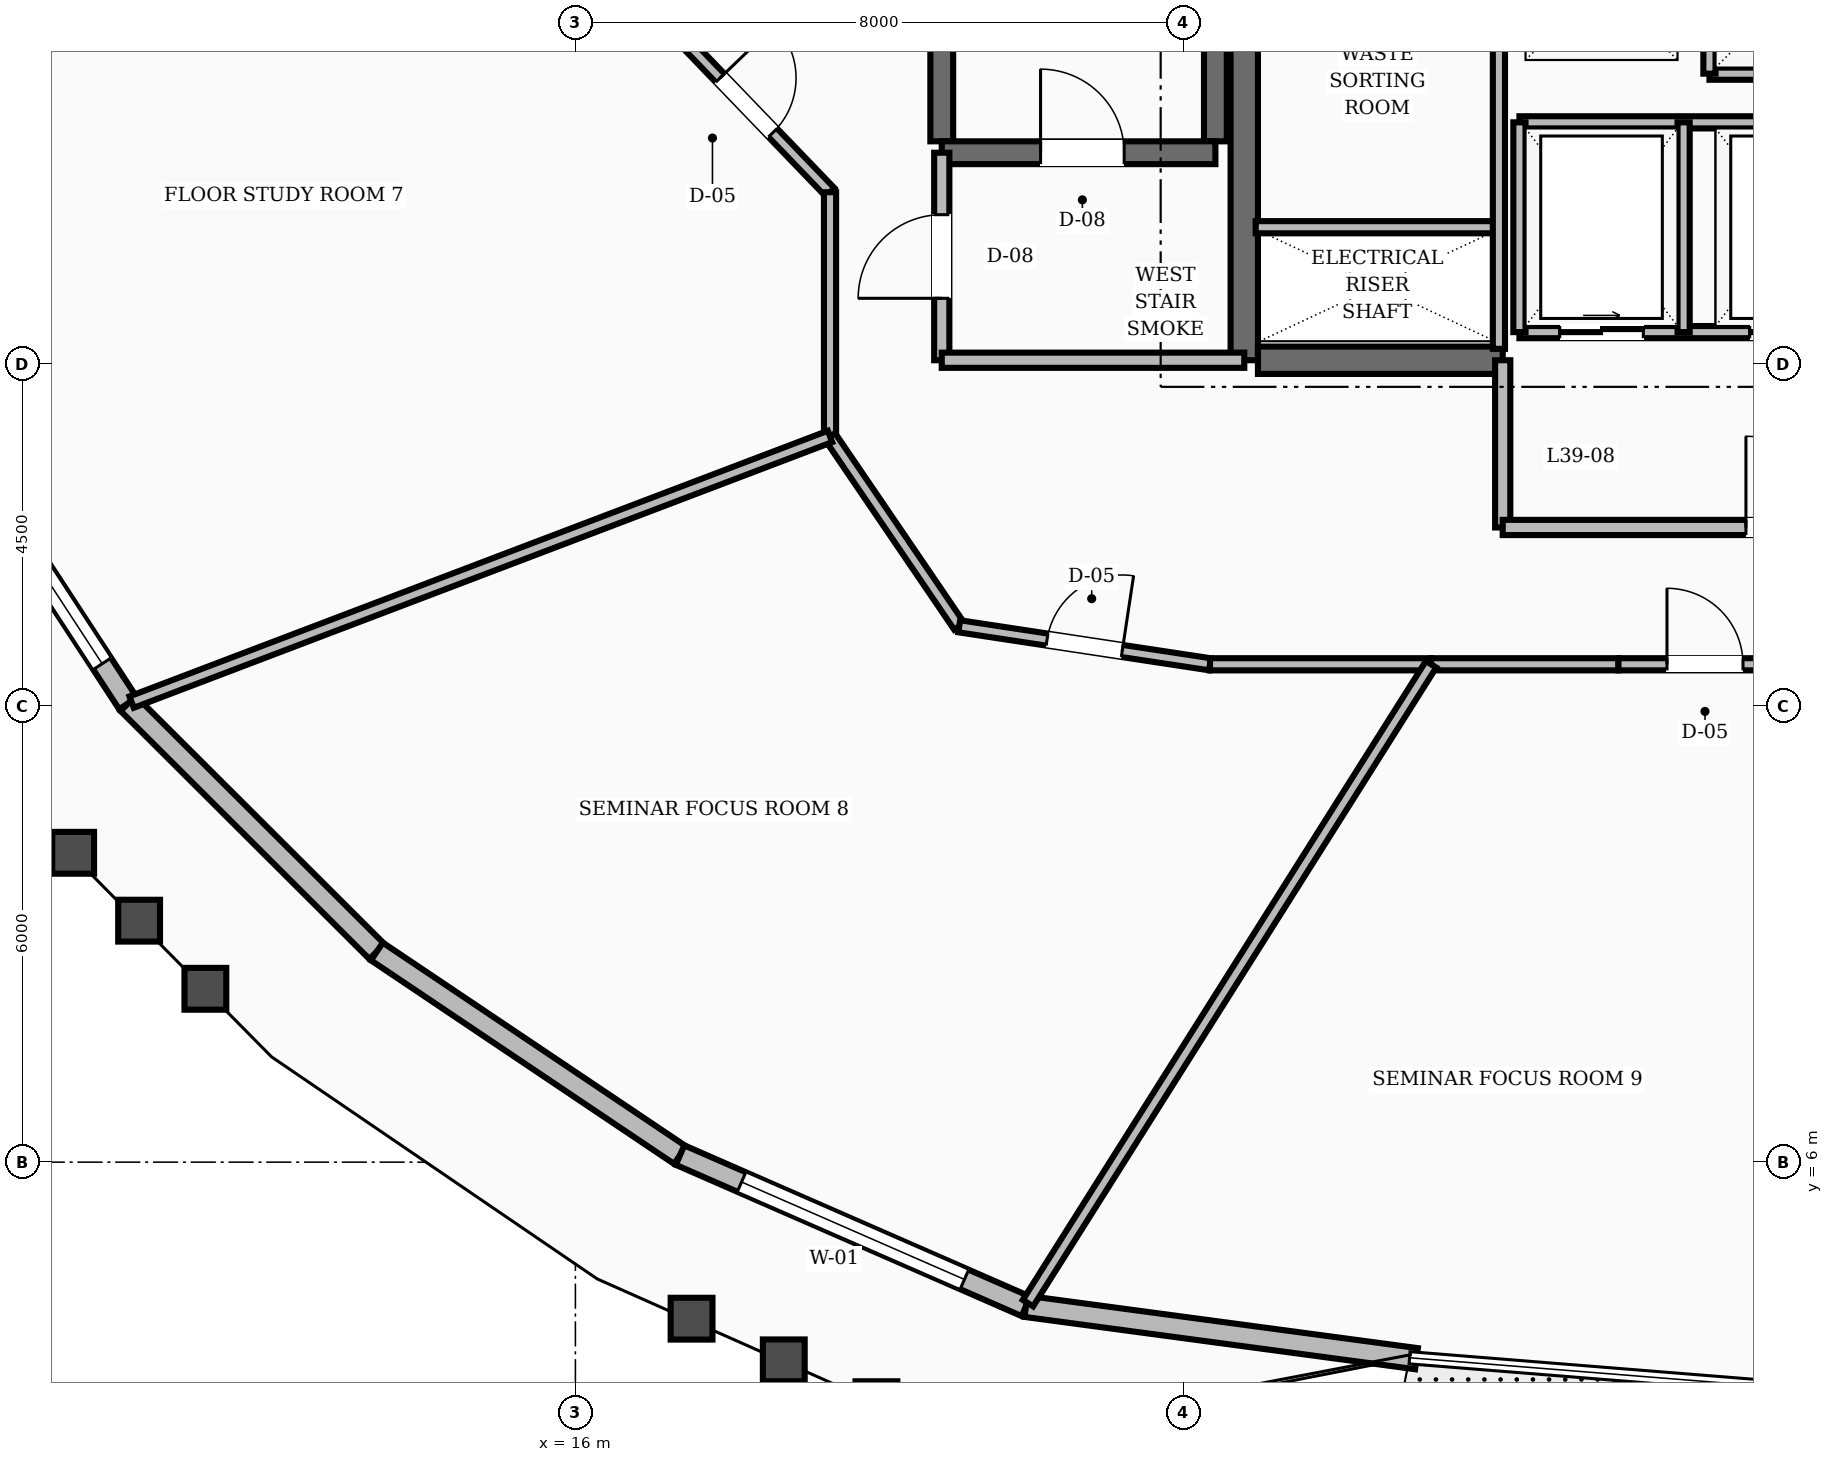
"""IFC4 building model, lengths in metres.
Left out: names, types, materials, properties, quantities, classifications, styles, units other than length and angle.
Written with IfcOpenShell. Run it as: python <this file> out.ifc"""

import sys

from ifc_helpers import new_model, si_unit, direction, frame, frame_2d, origin, place, context, subcontext, project, spatial, rectangle, extrude, element, fill, save


model = new_model("IFC4")
c1 = context("Model", 3, precision=1e-05, world=origin(), true_north=direction((0.0, 1.0)))
c2 = subcontext(c1, "Body", "Model", "MODEL_VIEW")
j1 = project(units=[si_unit("LENGTHUNIT", "METRE"), si_unit("PLANEANGLEUNIT", "RADIAN")], contexts=[c1])
p1 = place(None, origin())
s1 = spatial("IfcSite", under=j1, at=p1, CompositionType="ELEMENT")
p2 = place(p1, origin())
s2 = spatial("IfcBuilding", under=s1, at=p2, CompositionType="ELEMENT")
p3 = place(p2, frame((0.0, 0.0, 153.2)))
s3 = spatial("IfcBuildingStorey", under=s2, at=p3, CompositionType="ELEMENT", Elevation=153.2)
p4 = place(p3, frame((24.8, 16.55, 0.0), z_axis=(0.0, 0.0, 1.0), x_axis=(0.0, 1.0, 0.0)))
e1 = element("IfcWall", 1, at=p4, inside=s3, PredefinedType="SHEAR", context=c2, shape_type="SweptSolid", body=[
    extrude(rectangle(XDim=6.3, YDim=0.36, at=frame_2d((3.15, 0.0))), origin(), (0.0, 0.0, 1.0), 3.6),
])
p5 = place(p3, frame((24.98, 16.55, 0.0), z_axis=(0.0, 0.0, 1.0), x_axis=(1.0, 0.0, 0.0)))
e2 = element("IfcWall", 2, at=p5, inside=s3, PredefinedType="SHEAR", context=c2, shape_type="SweptSolid", body=[
    extrude(rectangle(XDim=3.22, YDim=0.36, at=frame_2d((1.61, 0.0))), origin(), (0.0, 0.0, 1.0), 3.6),
])
for number, where, z_axis, x_axis in (
    (3, (20.82, 19.43, 0.0), (0.0, 0.0, 1.0), (0.0, 1.0, 0.0)),
    (4, (24.42, 19.43, 0.0), (0.0, 0.0, 1.0), (0.0, 1.0, 0.0)),
):
    element("IfcWall", number, at=place(p3, frame(where, z_axis=z_axis, x_axis=x_axis)), inside=s3, PredefinedType="SHEAR", context=c2, shape_type="SweptSolid", body=[
        extrude(rectangle(XDim=8.74, YDim=0.3, at=frame_2d((4.37, 0.0))), origin(), (0.0, 0.0, 1.0), 3.6),
    ])
p6 = place(p3, frame((20.82, 19.28, 0.0), z_axis=(0.0, 0.0, 1.0), x_axis=(1.0, 0.0, 0.0)))
e5 = element("IfcWall", 5, at=p6, inside=s3, PredefinedType="SHEAR", context=c2, shape_type="SweptSolid", body=[
    extrude(rectangle(XDim=3.6, YDim=0.3, at=frame_2d((1.8, 0.0))), origin(), (0.0, 0.0, 1.0), 3.6),
])
p7 = place(p6, frame((1.3, 0.0, 0.0)))
e6 = element("IfcOpeningElement", 6, at=p7, cuts=e5, PredefinedType="OPENING", context=c2, shape_type="SweptSolid", body=[
    extrude(rectangle(XDim=1.1, YDim=2.1, at=frame_2d((0.55, 1.05))), frame((0.0, 0.16, 0.0), z_axis=(0.0, -1.0, 0.0), x_axis=(1.0, 0.0, 0.0)), (0.0, 0.0, 1.0), 0.32),
])
p8 = place(p3, frame((7.683, 15.758, 0.0), z_axis=(0.0, 0.0, 1.0), x_axis=(0.546910623985, -0.837190999338, 0.0)))
e7 = element("IfcWall", 7, at=p8, inside=s3, PredefinedType="STANDARD", context=c2, shape_type="SweptSolid", body=[
    extrude(rectangle(XDim=4.448, YDim=0.28, at=frame_2d((2.224, 0.0))), origin(), (0.0, 0.0, 1.0), 2.82),
])
p9 = place(p8, frame((0.624, 0.0, 0.8)))
e8 = element("IfcOpeningElement", 8, at=p9, cuts=e7, PredefinedType="OPENING", context=c2, shape_type="SweptSolid", body=[
    extrude(rectangle(XDim=3.2, YDim=1.65, at=frame_2d((1.6, 0.825))), frame((0.0, 0.15, 0.0), z_axis=(0.0, -1.0, 0.0), x_axis=(1.0, 0.0, 0.0)), (0.0, 0.0, 1.0), 0.3),
])
p10 = place(p3, frame((10.115, 12.035, 0.0), z_axis=(0.0, 0.0, 1.0), x_axis=(0.708162399008, -0.706049585108, 0.0)))
e9 = element("IfcWall", 9, at=p10, inside=s3, PredefinedType="STANDARD", context=c2, shape_type="SweptSolid", body=[
    extrude(rectangle(XDim=4.622, YDim=0.28, at=frame_2d((2.311, 0.0))), origin(), (0.0, 0.0, 1.0), 2.82),
])
p11 = place(p3, frame((13.388, 8.771, 0.0), z_axis=(0.0, 0.0, 1.0), x_axis=(0.830192910363, -0.557476216158, 0.0)))
e10 = element("IfcWall", 10, at=p11, inside=s3, PredefinedType="STANDARD", context=c2, shape_type="SweptSolid", body=[
    extrude(rectangle(XDim=4.805, YDim=0.28, at=frame_2d((2.402, 0.0))), origin(), (0.0, 0.0, 1.0), 2.82),
])
p12 = place(p3, frame((17.377, 6.093, 0.0), z_axis=(0.0, 0.0, 1.0), x_axis=(0.916213737075, -0.400689890058, 0.0)))
e11 = element("IfcWall", 11, at=p12, inside=s3, PredefinedType="STANDARD", context=c2, shape_type="SweptSolid", body=[
    extrude(rectangle(XDim=4.966, YDim=0.28, at=frame_2d((2.483, 0.0))), origin(), (0.0, 0.0, 1.0), 2.82),
])
p13 = place(p12, frame((0.883, 0.0, 0.8)))
e12 = element("IfcOpeningElement", 12, at=p13, cuts=e11, PredefinedType="OPENING", context=c2, shape_type="SweptSolid", body=[
    extrude(rectangle(XDim=3.2, YDim=1.65, at=frame_2d((1.6, 0.825))), frame((0.0, 0.15, 0.0), z_axis=(0.0, -1.0, 0.0), x_axis=(1.0, 0.0, 0.0)), (0.0, 0.0, 1.0), 0.3),
])
p14 = place(p3, frame((21.927, 4.103, 0.0), z_axis=(0.0, 0.0, 1.0), x_axis=(0.991142142186, -0.132805323623, 0.0)))
e13 = element("IfcWall", 13, at=p14, inside=s3, PredefinedType="STANDARD", context=c2, shape_type="SweptSolid", body=[
    extrude(rectangle(XDim=5.184, YDim=0.28, at=frame_2d((2.592, 0.0))), origin(), (0.0, 0.0, 1.0), 2.82),
])
p15 = place(p3, frame((20.82, 16.55, 0.0), z_axis=(0.0, 0.0, 1.0), x_axis=(0.0, 1.0, 0.0)))
e14 = element("IfcWall", 14, at=p15, inside=s3, PredefinedType="SOLIDWALL", context=c2, shape_type="SweptSolid", body=[
    extrude(rectangle(XDim=2.73, YDim=0.2, at=frame_2d((1.365, 0.0))), origin(), (0.0, 0.0, 1.0), 2.8),
])
p16 = place(p15, frame((0.815, 0.0, 0.0)))
e15 = element("IfcOpeningElement", 15, at=p16, cuts=e14, PredefinedType="OPENING", context=c2, shape_type="SweptSolid", body=[
    extrude(rectangle(XDim=1.1, YDim=2.1, at=frame_2d((0.55, 1.05))), frame((0.0, 0.11, 0.0), z_axis=(0.0, -1.0, 0.0), x_axis=(1.0, 0.0, 0.0)), (0.0, 0.0, 1.0), 0.22),
])
p17 = place(p3, frame((20.82, 16.55, 0.0), z_axis=(0.0, 0.0, 1.0), x_axis=(1.0, 0.0, 0.0)))
e16 = element("IfcWall", 16, at=p17, inside=s3, PredefinedType="SOLIDWALL", context=c2, shape_type="SweptSolid", body=[
    extrude(rectangle(XDim=3.98, YDim=0.2, at=frame_2d((1.99, 0.0))), origin(), (0.0, 0.0, 1.0), 2.8),
])
p18 = place(p3, frame((28.2, 14.35, 0.0), z_axis=(0.0, 0.0, 1.0), x_axis=(0.0, 1.0, 0.0)))
e17 = element("IfcWall", 17, at=p18, inside=s3, PredefinedType="SOLIDWALL", context=c2, shape_type="SweptSolid", body=[
    extrude(rectangle(XDim=2.2, YDim=0.2, at=frame_2d((1.1, 0.0))), origin(), (0.0, 0.0, 1.0), 2.8),
])
p19 = place(p3, frame((28.2, 14.35, 0.0), z_axis=(0.0, 0.0, 1.0), x_axis=(1.0, 0.0, 0.0)))
e18 = element("IfcWall", 18, at=p19, inside=s3, PredefinedType="SOLIDWALL", context=c2, shape_type="SweptSolid", body=[
    extrude(rectangle(XDim=7.6, YDim=0.2, at=frame_2d((3.8, 0.0))), origin(), (0.0, 0.0, 1.0), 2.8),
])
p20 = place(p19, frame((3.2, 0.0, 0.0)))
e19 = element("IfcOpeningElement", 19, at=p20, cuts=e18, PredefinedType="OPENING", context=c2, shape_type="SweptSolid", body=[
    extrude(rectangle(XDim=1.2, YDim=2.1, at=frame_2d((0.6, 1.05))), frame((0.0, 0.11, 0.0), z_axis=(0.0, -1.0, 0.0), x_axis=(1.0, 0.0, 0.0)), (0.0, 0.0, 1.0), 0.22),
])
p21 = place(p3, frame((30.92, 20.32, 0.0), z_axis=(0.0, 0.0, 1.0), x_axis=(1.0, 0.0, 0.0)))
e20 = element("IfcWall", 20, at=p21, inside=s3, PredefinedType="SOLIDWALL", context=c2, shape_type="SweptSolid", body=[
    extrude(rectangle(XDim=4.76, YDim=0.16, at=frame_2d((2.38, 0.0))), origin(), (0.0, 0.0, 1.0), 2.8),
])
p22 = place(p3, frame((30.92, 20.32, 0.0), z_axis=(0.0, 0.0, 1.0), x_axis=(0.0, 1.0, 0.0)))
e21 = element("IfcWall", 21, at=p22, inside=s3, PredefinedType="SOLIDWALL", context=c2, shape_type="SweptSolid", body=[
    extrude(rectangle(XDim=2.36, YDim=0.16, at=frame_2d((1.18, 0.0))), origin(), (0.0, 0.0, 1.0), 2.8),
])
p23 = place(p3, frame((28.42, 16.92, 0.0), z_axis=(0.0, 0.0, 1.0), x_axis=(1.0, 0.0, 0.0)))
e22 = element("IfcWall", 22, at=p23, inside=s3, PredefinedType="SOLIDWALL", context=c2, shape_type="SweptSolid", body=[
    extrude(rectangle(XDim=7.16, YDim=0.16, at=frame_2d((3.58, 0.0))), origin(), (0.0, 0.0, 1.0), 2.8),
])
p24 = place(p23, frame((0.53, 0.0, 0.0)))
e23 = element("IfcOpeningElement", 23, at=p24, cuts=e22, PredefinedType="OPENING", context=c2, shape_type="SweptSolid", body=[
    extrude(rectangle(XDim=1.1, YDim=2.15, at=frame_2d((0.55, 1.075))), frame((0.0, 0.09, 0.0), z_axis=(0.0, -1.0, 0.0), x_axis=(1.0, 0.0, 0.0)), (0.0, 0.0, 1.0), 0.18),
])
p25 = place(p23, frame((3.03, 0.0, 0.0)))
e24 = element("IfcOpeningElement", 24, at=p25, cuts=e22, PredefinedType="OPENING", context=c2, shape_type="SweptSolid", body=[
    extrude(rectangle(XDim=1.1, YDim=2.15, at=frame_2d((0.55, 1.075))), frame((0.0, 0.09, 0.0), z_axis=(0.0, -1.0, 0.0), x_axis=(1.0, 0.0, 0.0)), (0.0, 0.0, 1.0), 0.18),
])
p26 = place(p23, frame((5.53, 0.0, 0.0)))
e25 = element("IfcOpeningElement", 25, at=p26, cuts=e22, PredefinedType="OPENING", context=c2, shape_type="SweptSolid", body=[
    extrude(rectangle(XDim=1.1, YDim=2.15, at=frame_2d((0.55, 1.075))), frame((0.0, 0.09, 0.0), z_axis=(0.0, -1.0, 0.0), x_axis=(1.0, 0.0, 0.0)), (0.0, 0.0, 1.0), 0.18),
])
p27 = place(p3, frame((28.42, 19.68, 0.0), z_axis=(0.0, 0.0, 1.0), x_axis=(1.0, 0.0, 0.0)))
e26 = element("IfcWall", 26, at=p27, inside=s3, PredefinedType="SOLIDWALL", context=c2, shape_type="SweptSolid", body=[
    extrude(rectangle(XDim=7.16, YDim=0.16, at=frame_2d((3.58, 0.0))), origin(), (0.0, 0.0, 1.0), 2.8),
])
for number, where, z_axis, x_axis in (
    (27, (28.42, 16.92, 0.0), (0.0, 0.0, 1.0), (0.0, 1.0, 0.0)),
    (28, (30.58, 16.92, 0.0), (0.0, 0.0, 1.0), (0.0, 1.0, 0.0)),
):
    element("IfcWall", number, at=place(p3, frame(where, z_axis=z_axis, x_axis=x_axis)), inside=s3, PredefinedType="SOLIDWALL", context=c2, shape_type="SweptSolid", body=[
        extrude(rectangle(XDim=2.76, YDim=0.16, at=frame_2d((1.38, 0.0))), origin(), (0.0, 0.0, 1.0), 2.8),
    ])
p28 = place(p3, frame((24.95, 18.3, 0.0), z_axis=(0.0, 0.0, 1.0), x_axis=(1.0, 0.0, 0.0)))
e29 = element("IfcWall", 29, at=p28, inside=s3, PredefinedType="SOLIDWALL", context=c2, shape_type="SweptSolid", body=[
    extrude(rectangle(XDim=3.2, YDim=0.16, at=frame_2d((1.6, 0.0))), origin(), (0.0, 0.0, 1.0), 2.8),
])
p29 = place(p3, frame((28.15, 16.7, 0.0), z_axis=(0.0, 0.0, 1.0), x_axis=(0.0, 1.0, 0.0)))
e30 = element("IfcWall", 30, at=p29, inside=s3, PredefinedType="SOLIDWALL", context=c2, shape_type="SweptSolid", body=[
    extrude(rectangle(XDim=6.05, YDim=0.16, at=frame_2d((3.025, 0.0))), origin(), (0.0, 0.0, 1.0), 2.8),
])
p30 = place(p3, frame((17.15, 21.046, 0.0), z_axis=(0.0, 0.0, 1.0), x_axis=(0.693473090138, -0.72048252807, 0.0)))
e31 = element("IfcWall", 31, at=p30, inside=s3, PredefinedType="SOLIDWALL", context=c2, shape_type="SweptSolid", body=[
    extrude(rectangle(XDim=3.173, YDim=0.16, at=frame_2d((1.586, 0.0))), origin(), (0.0, 0.0, 1.0), 2.8),
])
p31 = place(p30, frame((1.086, 0.0, 0.0)))
e32 = element("IfcOpeningElement", 32, at=p31, cuts=e31, PredefinedType="OPENING", context=c2, shape_type="SweptSolid", body=[
    extrude(rectangle(XDim=1.0, YDim=2.1, at=frame_2d((0.5, 1.05))), frame((0.0, 0.09, 0.0), z_axis=(0.0, -1.0, 0.0), x_axis=(1.0, 0.0, 0.0)), (0.0, 0.0, 1.0), 0.18),
])
p32 = place(p3, frame((19.35, 18.76, 0.0), z_axis=(0.0, 0.0, 1.0), x_axis=(0.0, -1.0, 0.0)))
e33 = element("IfcWall", 33, at=p32, inside=s3, PredefinedType="SOLIDWALL", context=c2, shape_type="SweptSolid", body=[
    extrude(rectangle(XDim=3.213, YDim=0.16, at=frame_2d((1.606, 0.0))), origin(), (0.0, 0.0, 1.0), 2.8),
])
p33 = place(p3, frame((19.35, 15.548, 0.0), z_axis=(0.0, 0.0, 1.0), x_axis=(0.562674669208, -0.826678423955, 0.0)))
e34 = element("IfcWall", 34, at=p33, inside=s3, PredefinedType="SOLIDWALL", context=c2, shape_type="SweptSolid", body=[
    extrude(rectangle(XDim=3.021, YDim=0.16, at=frame_2d((1.511, 0.0))), origin(), (0.0, 0.0, 1.0), 2.8),
])
p34 = place(p3, frame((21.05, 13.05, 0.0), z_axis=(0.0, 0.0, 1.0), x_axis=(0.988710906508, -0.149835721217, 0.0)))
e35 = element("IfcWall", 35, at=p34, inside=s3, PredefinedType="SOLIDWALL", context=c2, shape_type="SweptSolid", body=[
    extrude(rectangle(XDim=3.337, YDim=0.16, at=frame_2d((1.668, 0.0))), origin(), (0.0, 0.0, 1.0), 2.8),
])
p35 = place(p34, frame((1.168, 0.0, 0.0)))
e36 = element("IfcOpeningElement", 36, at=p35, cuts=e35, PredefinedType="OPENING", context=c2, shape_type="SweptSolid", body=[
    extrude(rectangle(XDim=1.0, YDim=2.1, at=frame_2d((0.5, 1.05))), frame((0.0, 0.09, 0.0), z_axis=(0.0, -1.0, 0.0), x_axis=(1.0, 0.0, 0.0)), (0.0, 0.0, 1.0), 0.18),
])
p36 = place(p3, frame((24.349, 12.55, 0.0), z_axis=(0.0, 0.0, 1.0), x_axis=(1.0, 0.0, 0.0)))
e37 = element("IfcWall", 37, at=p36, inside=s3, PredefinedType="SOLIDWALL", context=c2, shape_type="SweptSolid", body=[
    extrude(rectangle(XDim=2.908, YDim=0.16, at=frame_2d((1.454, 0.0))), origin(), (0.0, 0.0, 1.0), 2.8),
])
p37 = place(p3, frame((27.257, 12.55, 0.0), z_axis=(0.0, 0.0, 1.0), x_axis=(1.0, 0.0, 0.0)))
e38 = element("IfcWall", 38, at=p37, inside=s3, PredefinedType="SOLIDWALL", context=c2, shape_type="SweptSolid", body=[
    extrude(rectangle(XDim=2.465, YDim=0.16, at=frame_2d((1.232, 0.0))), origin(), (0.0, 0.0, 1.0), 2.8),
])
p38 = place(p3, frame((29.722, 12.55, 0.0), z_axis=(0.0, 0.0, 1.0), x_axis=(1.0, 0.0, 0.0)))
e39 = element("IfcWall", 39, at=p38, inside=s3, PredefinedType="SOLIDWALL", context=c2, shape_type="SweptSolid", body=[
    extrude(rectangle(XDim=2.278, YDim=0.16, at=frame_2d((1.139, 0.0))), origin(), (0.0, 0.0, 1.0), 2.8),
])
p39 = place(p38, frame((0.639, 0.0, 0.0)))
e40 = element("IfcOpeningElement", 40, at=p39, cuts=e39, PredefinedType="OPENING", context=c2, shape_type="SweptSolid", body=[
    extrude(rectangle(XDim=1.0, YDim=2.1, at=frame_2d((0.5, 1.05))), frame((0.0, 0.09, 0.0), z_axis=(0.0, -1.0, 0.0), x_axis=(1.0, 0.0, 0.0)), (0.0, 0.0, 1.0), 0.18),
])
p40 = place(p3, frame((19.35, 15.548, 0.0), z_axis=(0.0, 0.0, 1.0), x_axis=(-0.934670555549, -0.355515052549, 0.0)))
e41 = element("IfcWall", 41, at=p40, inside=s3, PredefinedType="SOLIDWALL", context=c2, shape_type="SweptSolid", body=[
    extrude(rectangle(XDim=9.831, YDim=0.16, at=frame_2d((4.915, 0.0))), origin(), (0.0, 0.0, 1.0), 2.8),
])
p41 = place(p3, frame((27.257, 12.55, 0.0), z_axis=(0.0, 0.0, 1.0), x_axis=(-0.53362877713, -0.84571882338, 0.0)))
e42 = element("IfcWall", 42, at=p41, inside=s3, PredefinedType="SOLIDWALL", context=c2, shape_type="SweptSolid", body=[
    extrude(rectangle(XDim=9.938, YDim=0.16, at=frame_2d((4.969, 0.0))), origin(), (0.0, 0.0, 1.0), 2.8),
])
p42 = place(p9, origin())
e43 = element("IfcWindow", 43, at=p42, inside=s3, PartitioningType="SINGLE_PANEL", PredefinedType="WINDOW", context=c2, shape_type="SweptSolid", body=[
    extrude(rectangle(XDim=3.2, YDim=1.65, at=frame_2d((1.6, 0.825))), frame((0.0, 0.03, 0.0), z_axis=(0.0, -1.0, 0.0), x_axis=(1.0, 0.0, 0.0)), (0.0, 0.0, 1.0), 0.06),
])
fill(e8, e43)
p43 = place(p13, origin())
e44 = element("IfcWindow", 44, at=p43, inside=s3, PartitioningType="SINGLE_PANEL", PredefinedType="WINDOW", context=c2, shape_type="SweptSolid", body=[
    extrude(rectangle(XDim=3.2, YDim=1.65, at=frame_2d((1.6, 0.825))), frame((0.0, 0.03, 0.0), z_axis=(0.0, -1.0, 0.0), x_axis=(1.0, 0.0, 0.0)), (0.0, 0.0, 1.0), 0.06),
])
fill(e12, e44)
p44 = place(p7, origin())
e45 = element("IfcDoor", 45, at=p44, inside=s3, OperationType="SINGLE_SWING_LEFT", PredefinedType="DOOR", context=c2, shape_type="SweptSolid", body=[
    extrude(rectangle(XDim=1.1, YDim=2.1, at=frame_2d((0.55, 1.05))), frame((0.0, 0.025, 0.0), z_axis=(0.0, -1.0, 0.0), x_axis=(1.0, 0.0, 0.0)), (0.0, 0.0, 1.0), 0.05),
])
fill(e6, e45)
p45 = place(p16, origin())
e46 = element("IfcDoor", 46, at=p45, inside=s3, OperationType="SINGLE_SWING_LEFT", PredefinedType="DOOR", context=c2, shape_type="SweptSolid", body=[
    extrude(rectangle(XDim=1.1, YDim=2.1, at=frame_2d((0.55, 1.05))), frame((0.0, 0.025, 0.0), z_axis=(0.0, -1.0, 0.0), x_axis=(1.0, 0.0, 0.0)), (0.0, 0.0, 1.0), 0.05),
])
fill(e15, e46)
p46 = place(p20, origin())
e47 = element("IfcDoor", 47, at=p46, inside=s3, OperationType="SINGLE_SWING_LEFT", PredefinedType="DOOR", context=c2, shape_type="SweptSolid", body=[
    extrude(rectangle(XDim=1.2, YDim=2.1, at=frame_2d((0.6, 1.05))), frame((0.0, 0.025, 0.0), z_axis=(0.0, -1.0, 0.0), x_axis=(1.0, 0.0, 0.0)), (0.0, 0.0, 1.0), 0.05),
])
fill(e19, e47)
p47 = place(p24, origin())
e48 = element("IfcDoor", 48, at=p47, inside=s3, OperationType="SLIDING_TO_RIGHT", PredefinedType="DOOR", context=c2, shape_type="SweptSolid", body=[
    extrude(rectangle(XDim=1.1, YDim=2.15, at=frame_2d((0.55, 1.075))), frame((0.0, 0.025, 0.0), z_axis=(0.0, -1.0, 0.0), x_axis=(1.0, 0.0, 0.0)), (0.0, 0.0, 1.0), 0.05),
])
fill(e23, e48)
p48 = place(p25, origin())
e49 = element("IfcDoor", 49, at=p48, inside=s3, OperationType="SLIDING_TO_RIGHT", PredefinedType="DOOR", context=c2, shape_type="SweptSolid", body=[
    extrude(rectangle(XDim=1.1, YDim=2.15, at=frame_2d((0.55, 1.075))), frame((0.0, 0.025, 0.0), z_axis=(0.0, -1.0, 0.0), x_axis=(1.0, 0.0, 0.0)), (0.0, 0.0, 1.0), 0.05),
])
fill(e24, e49)
p49 = place(p31, origin())
e50 = element("IfcDoor", 50, at=p49, inside=s3, OperationType="SINGLE_SWING_LEFT", PredefinedType="DOOR", context=c2, shape_type="SweptSolid", body=[
    extrude(rectangle(XDim=1.0, YDim=2.1, at=frame_2d((0.5, 1.05))), frame((0.0, 0.025, 0.0), z_axis=(0.0, -1.0, 0.0), x_axis=(1.0, 0.0, 0.0)), (0.0, 0.0, 1.0), 0.05),
])
fill(e32, e50)
p50 = place(p35, origin())
e51 = element("IfcDoor", 51, at=p50, inside=s3, OperationType="SINGLE_SWING_RIGHT", PredefinedType="DOOR", context=c2, shape_type="SweptSolid", body=[
    extrude(rectangle(XDim=1.0, YDim=2.1, at=frame_2d((0.5, 1.05))), frame((0.0, 0.025, 0.0), z_axis=(0.0, -1.0, 0.0), x_axis=(1.0, 0.0, 0.0)), (0.0, 0.0, 1.0), 0.05),
])
fill(e36, e51)
p51 = place(p39, origin())
e52 = element("IfcDoor", 52, at=p51, inside=s3, OperationType="SINGLE_SWING_LEFT", PredefinedType="DOOR", context=c2, shape_type="SweptSolid", body=[
    extrude(rectangle(XDim=1.0, YDim=2.1, at=frame_2d((0.5, 1.05))), frame((0.0, 0.025, 0.0), z_axis=(0.0, -1.0, 0.0), x_axis=(1.0, 0.0, 0.0)), (0.0, 0.0, 1.0), 0.05),
])
fill(e40, e52)
save(model, sys.argv[1])
